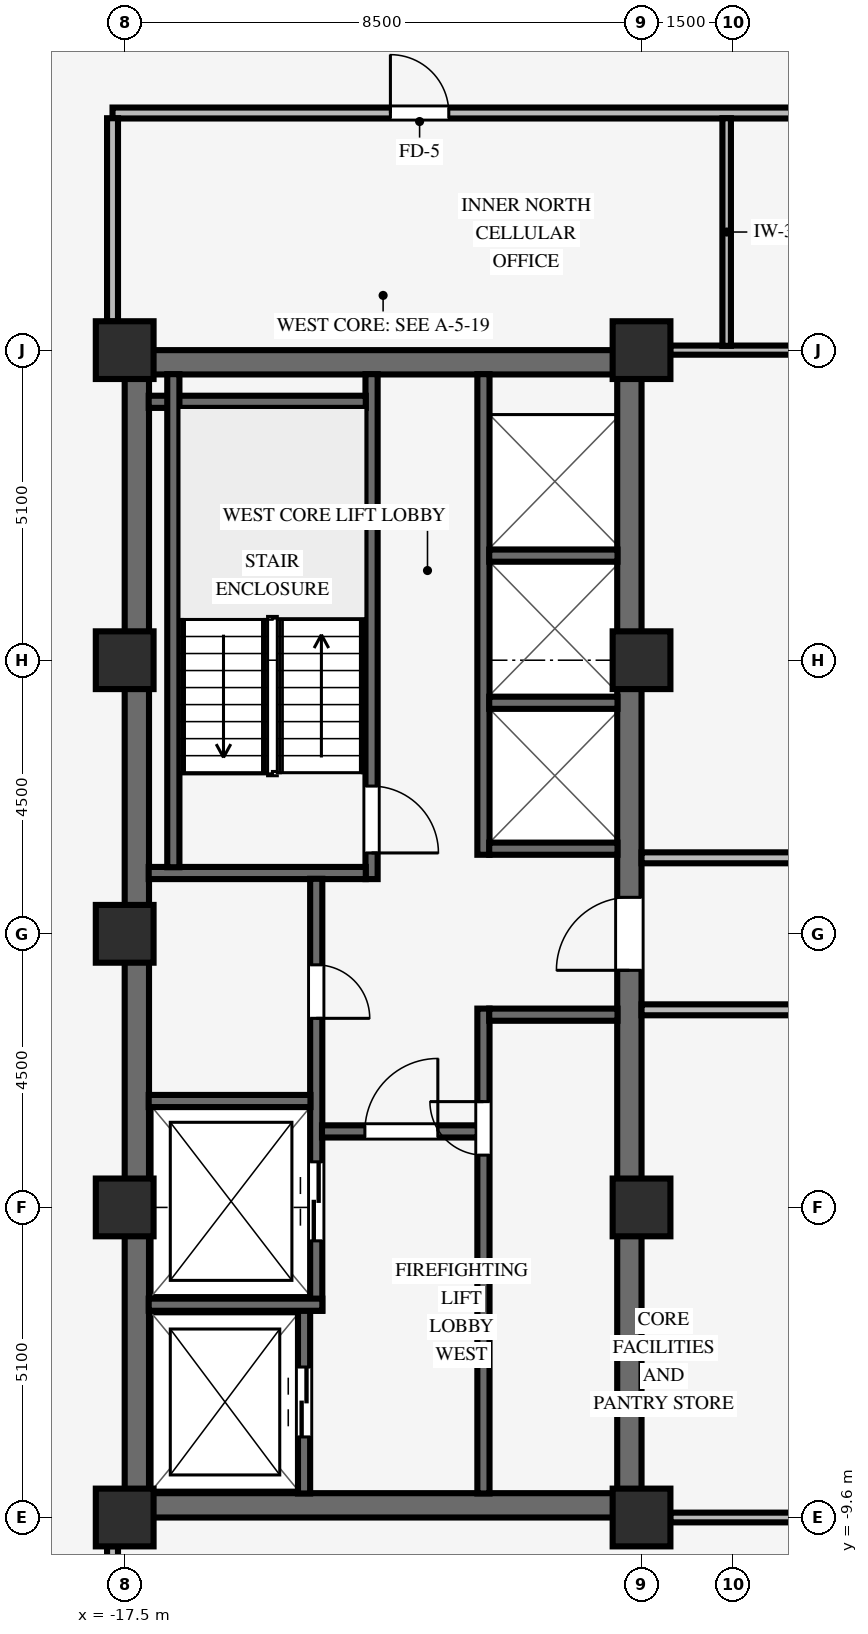
"""IFC4 building model, lengths in metres.
Left out: names, types, materials, properties, quantities, classifications, styles, units other than length and angle.
Written with IfcOpenShell. Run it as: python <this file> out.ifc"""

import sys

from ifc_helpers import new_model, si_unit, direction, frame, frame_2d, origin, origin_2d, place, context, subcontext, project, spatial, rectangle, extrude, source, transform, mapped, element, fill, save


model = new_model("IFC4")
c1 = context("Model", 3, precision=1e-05, world=origin(), true_north=direction((0.0, 1.0)))
c2 = subcontext(c1, "Body", "Model", "MODEL_VIEW")
j1 = project(units=[si_unit("LENGTHUNIT", "METRE"), si_unit("PLANEANGLEUNIT", "RADIAN")], contexts=[c1])
p1 = place(None, origin())
s1 = spatial("IfcSite", under=j1, at=p1, CompositionType="ELEMENT")
p2 = place(p1, origin())
s2 = spatial("IfcBuilding", under=s1, at=p2, CompositionType="ELEMENT")
p3 = place(p2, frame((0.0, 0.0, 142.1)))
s3 = spatial("IfcBuildingStorey", under=s2, at=p3, CompositionType="ELEMENT", Elevation=142.1)
for number, where, z_axis, x_axis in (
    (1, (-17.5, -9.4, 0.0), (0.0, 0.0, 1.0), (1.0, 0.0, 0.0)),
    (2, (-17.5, 9.4, 0.0), (0.0, 0.0, 1.0), (1.0, 0.0, 0.0)),
):
    element("IfcWall", number, at=place(p3, frame(where, z_axis=z_axis, x_axis=x_axis)), inside=s3, PredefinedType="SHEAR", context=c2, shape_type="SweptSolid", body=[
        extrude(rectangle(XDim=8.5, YDim=0.4, at=frame_2d((4.25, 0.0))), origin(), (0.0, 0.0, 1.0), 3.37),
    ])
p4 = place(p3, frame((-17.3, -9.205, 0.0), z_axis=(0.0, 0.0, 1.0), x_axis=(0.0, 1.0, 0.0)))
e3 = element("IfcWall", 3, at=p4, inside=s3, PredefinedType="SHEAR", context=c2, shape_type="SweptSolid", body=[
    extrude(rectangle(XDim=18.41, YDim=0.4, at=frame_2d((9.205, 0.0))), origin(), (0.0, 0.0, 1.0), 3.37),
])
p5 = place(p3, frame((-9.2, -9.205, 0.0), z_axis=(0.0, 0.0, 1.0), x_axis=(0.0, 1.0, 0.0)))
e4 = element("IfcWall", 4, at=p5, inside=s3, PredefinedType="SHEAR", context=c2, shape_type="SweptSolid", body=[
    extrude(rectangle(XDim=18.41, YDim=0.4, at=frame_2d((9.205, 0.0))), origin(), (0.0, 0.0, 1.0), 3.37),
])
p6 = place(p5, frame((8.605, 0.0, 0.0)))
e5 = element("IfcOpeningElement", 5, at=p6, cuts=e4, PredefinedType="OPENING", context=c2, shape_type="SweptSolid", body=[
    extrude(rectangle(XDim=1.2, YDim=2.15, at=frame_2d((0.6, 1.075))), frame((0.0, 0.21, 0.0), z_axis=(0.0, -1.0, 0.0), x_axis=(1.0, 0.0, 0.0)), (0.0, 0.0, 1.0), 0.42),
])
for number, where, z_axis, x_axis in (
    (6, (-17.5, -9.6, 0.0), (0.0, 0.0, 1.0), (1.0, 0.0, 0.0)),
    (7, (-17.5, -4.5, 0.0), (0.0, 0.0, 1.0), (1.0, 0.0, 0.0)),
    (8, (-17.5, 4.5, 0.0), (0.0, 0.0, 1.0), (1.0, 0.0, 0.0)),
    (9, (-17.5, 9.6, 0.0), (0.0, 0.0, 1.0), (1.0, 0.0, 0.0)),
    (10, (-9.0, -9.6, 0.0), (0.0, 0.0, 1.0), (1.0, 0.0, 0.0)),
    (11, (-9.0, -4.5, 0.0), (0.0, 0.0, 1.0), (1.0, 0.0, 0.0)),
    (12, (-9.0, 4.5, 0.0), (0.0, 0.0, 1.0), (1.0, 0.0, 0.0)),
    (13, (-9.0, 9.6, 0.0), (0.0, 0.0, 1.0), (1.0, 0.0, 0.0)),
    (14, (-17.5, 0.0, 0.0), (0.0, 0.0, 1.0), (1.0, 0.0, 0.0)),
):
    element("IfcColumn", number, at=place(p3, frame(where, z_axis=z_axis, x_axis=x_axis)), inside=s3, PredefinedType="COLUMN", context=c2, shape_type="SweptSolid", body=[
        extrude(rectangle(XDim=0.95, YDim=0.95, at=origin_2d()), origin(), (0.0, 0.0, 1.0), 3.37),
    ])
p7 = place(p3, frame((-13.44, 0.9, 0.0), z_axis=(0.0, 0.0, 1.0), x_axis=(0.0, 1.0, 0.0)))
e15 = element("IfcWall", 15, at=p7, inside=s3, PredefinedType="SHEAR", context=c2, shape_type="SweptSolid", body=[
    extrude(rectangle(XDim=8.305, YDim=0.2, at=frame_2d((4.153, 0.0))), origin(), (0.0, 0.0, 1.0), 3.37),
])
p8 = place(p7, frame((1.53, 0.0, 0.0), z_axis=(0.0, 0.0, 1.0), x_axis=(-1.0, 0.0, 0.0)))
e16 = element("IfcOpeningElement", 16, at=p8, cuts=e15, PredefinedType="OPENING", context=c2, shape_type="SweptSolid", body=[
    extrude(rectangle(XDim=1.1, YDim=2.15, at=frame_2d((0.55, 1.075))), frame((0.0, 0.11, 0.0), z_axis=(0.0, -1.0, 0.0), x_axis=(1.0, 0.0, 0.0)), (0.0, 0.0, 1.0), 0.22),
])
for number, where, z_axis, x_axis in (
    (17, (-17.105, 1.0, 0.0), (0.0, 0.0, 1.0), (1.0, 0.0, 0.0)),
    (18, (-17.105, 8.75, 0.0), (0.0, 0.0, 1.0), (1.0, 0.0, 0.0)),
):
    element("IfcWall", number, at=place(p3, frame(where, z_axis=z_axis, x_axis=x_axis)), inside=s3, PredefinedType="SHEAR", context=c2, shape_type="SweptSolid", body=[
        extrude(rectangle(XDim=3.57, YDim=0.2, at=frame_2d((1.785, 0.0))), origin(), (0.0, 0.0, 1.0), 3.37),
    ])
p9 = place(p3, frame((-16.7, 1.095, 0.0), z_axis=(0.0, 0.0, 1.0), x_axis=(0.0, 1.0, 0.0)))
e19 = element("IfcWall", 19, at=p9, inside=s3, PredefinedType="SHEAR", context=c2, shape_type="SweptSolid", body=[
    extrude(rectangle(XDim=8.11, YDim=0.2, at=frame_2d((4.055, 0.0))), origin(), (0.0, 0.0, 1.0), 3.37),
])
p10 = place(p3, frame((-14.55, -9.205, 0.0), z_axis=(0.0, 0.0, 1.0), x_axis=(0.0, 1.0, 0.0)))
e20 = element("IfcWall", 20, at=p10, inside=s3, PredefinedType="SHEAR", context=c2, shape_type="SweptSolid", body=[
    extrude(rectangle(XDim=3.01, YDim=0.2, at=frame_2d((1.505, 0.0))), origin(), (0.0, 0.0, 1.0), 3.37),
])
p11 = place(p10, frame((0.93, 0.0, 0.0)))
e21 = element("IfcOpeningElement", 21, at=p11, cuts=e20, PredefinedType="OPENING", context=c2, shape_type="SweptSolid", body=[
    extrude(rectangle(XDim=1.15, YDim=2.15, at=frame_2d((0.575, 1.075))), frame((0.0, 0.11, 0.0), z_axis=(0.0, -1.0, 0.0), x_axis=(1.0, 0.0, 0.0)), (0.0, 0.0, 1.0), 0.22),
])
p12 = place(p3, frame((-14.35, -6.2, 0.0), z_axis=(0.0, 0.0, 1.0), x_axis=(0.0, 1.0, 0.0)))
e22 = element("IfcWall", 22, at=p12, inside=s3, PredefinedType="SHEAR", context=c2, shape_type="SweptSolid", body=[
    extrude(rectangle(XDim=7.105, YDim=0.2, at=frame_2d((3.552, 0.0))), origin(), (0.0, 0.0, 1.0), 3.37),
])
p13 = place(p12, frame((5.69, 0.0, 0.0), z_axis=(0.0, 0.0, 1.0), x_axis=(-1.0, 0.0, 0.0)))
e23 = element("IfcOpeningElement", 23, at=p13, cuts=e22, PredefinedType="OPENING", context=c2, shape_type="SweptSolid", body=[
    extrude(rectangle(XDim=0.88, YDim=2.1, at=frame_2d((0.44, 1.05))), frame((0.0, 0.11, 0.0), z_axis=(0.0, -1.0, 0.0), x_axis=(1.0, 0.0, 0.0)), (0.0, 0.0, 1.0), 0.22),
])
p14 = place(p12, frame((1.15, 0.0, 0.0)))
e24 = element("IfcOpeningElement", 24, at=p14, cuts=e22, PredefinedType="OPENING", context=c2, shape_type="SweptSolid", body=[
    extrude(rectangle(XDim=1.3, YDim=2.2, at=frame_2d((0.65, 1.1))), frame((0.0, 0.11, 0.0), z_axis=(0.0, -1.0, 0.0), x_axis=(1.0, 0.0, 0.0)), (0.0, 0.0, 1.0), 0.22),
])
p15 = place(p3, frame((-17.105, -6.1, 0.0), z_axis=(0.0, 0.0, 1.0), x_axis=(1.0, 0.0, 0.0)))
e25 = element("IfcWall", 25, at=p15, inside=s3, PredefinedType="SHEAR", context=c2, shape_type="SweptSolid", body=[
    extrude(rectangle(XDim=2.855, YDim=0.2, at=frame_2d((1.427, 0.0))), origin(), (0.0, 0.0, 1.0), 3.37),
])
p16 = place(p3, frame((-17.105, -2.75, 0.0), z_axis=(0.0, 0.0, 1.0), x_axis=(1.0, 0.0, 0.0)))
e26 = element("IfcWall", 26, at=p16, inside=s3, PredefinedType="SHEAR", context=c2, shape_type="SweptSolid", body=[
    extrude(rectangle(XDim=2.66, YDim=0.2, at=frame_2d((1.33, 0.0))), origin(), (0.0, 0.0, 1.0), 3.37),
])
p17 = place(p3, frame((-11.6, -9.205, 0.0), z_axis=(0.0, 0.0, 1.0), x_axis=(0.0, 1.0, 0.0)))
e27 = element("IfcWall", 27, at=p17, inside=s3, PredefinedType="SHEAR", context=c2, shape_type="SweptSolid", body=[
    extrude(rectangle(XDim=7.975, YDim=0.2, at=frame_2d((3.988, 0.0))), origin(), (0.0, 0.0, 1.0), 3.37),
])
p18 = place(p17, frame((5.565, 0.0, 0.0)))
e28 = element("IfcOpeningElement", 28, at=p18, cuts=e27, PredefinedType="OPENING", context=c2, shape_type="SweptSolid", body=[
    extrude(rectangle(XDim=0.88, YDim=2.1, at=frame_2d((0.44, 1.05))), frame((0.0, 0.11, 0.0), z_axis=(0.0, -1.0, 0.0), x_axis=(1.0, 0.0, 0.0)), (0.0, 0.0, 1.0), 0.22),
])
p19 = place(p3, frame((-14.255, -3.25, 0.0), z_axis=(0.0, 0.0, 1.0), x_axis=(1.0, 0.0, 0.0)))
e29 = element("IfcWall", 29, at=p19, inside=s3, PredefinedType="SHEAR", context=c2, shape_type="SweptSolid", body=[
    extrude(rectangle(XDim=2.56, YDim=0.2, at=frame_2d((1.28, 0.0))), origin(), (0.0, 0.0, 1.0), 3.37),
])
p20 = place(p19, frame((0.705, 0.0, 0.0)))
e30 = element("IfcOpeningElement", 30, at=p20, cuts=e29, PredefinedType="OPENING", context=c2, shape_type="SweptSolid", body=[
    extrude(rectangle(XDim=1.2, YDim=2.15, at=frame_2d((0.6, 1.075))), frame((0.0, 0.11, 0.0), z_axis=(0.0, -1.0, 0.0), x_axis=(1.0, 0.0, 0.0)), (0.0, 0.0, 1.0), 0.22),
])
p21 = place(p3, frame((-11.505, -1.33, 0.0), z_axis=(0.0, 0.0, 1.0), x_axis=(1.0, 0.0, 0.0)))
e31 = element("IfcWall", 31, at=p21, inside=s3, PredefinedType="SHEAR", context=c2, shape_type="SweptSolid", body=[
    extrude(rectangle(XDim=2.11, YDim=0.2, at=frame_2d((1.055, 0.0))), origin(), (0.0, 0.0, 1.0), 3.37),
])
p22 = place(p3, frame((-11.6, 1.3, 0.0), z_axis=(0.0, 0.0, 1.0), x_axis=(0.0, 1.0, 0.0)))
e32 = element("IfcWall", 32, at=p22, inside=s3, PredefinedType="SHEAR", context=c2, shape_type="SweptSolid", body=[
    extrude(rectangle(XDim=7.905, YDim=0.2, at=frame_2d((3.953, 0.0))), origin(), (0.0, 0.0, 1.0), 3.37),
])
for number, where, z_axis, x_axis in (
    (33, (-11.505, 1.4, 0.0), (0.0, 0.0, 1.0), (1.0, 0.0, 0.0)),
    (34, (-11.505, 3.8, 0.0), (0.0, 0.0, 1.0), (1.0, 0.0, 0.0)),
    (35, (-11.505, 6.22, 0.0), (0.0, 0.0, 1.0), (1.0, 0.0, 0.0)),
):
    element("IfcWall", number, at=place(p3, frame(where, z_axis=z_axis, x_axis=x_axis)), inside=s3, PredefinedType="SHEAR", context=c2, shape_type="SweptSolid", body=[
        extrude(rectangle(XDim=2.11, YDim=0.2, at=frame_2d((1.055, 0.0))), origin(), (0.0, 0.0, 1.0), 3.37),
    ])
p23 = place(p3, frame((-8.529, -9.6, 0.0), z_axis=(0.0, 0.0, 1.0), x_axis=(1.0, 0.0, 0.0)))
e36 = element("IfcWall", 36, at=p23, inside=s3, PredefinedType="PARTITIONING", context=c2, shape_type="SweptSolid", body=[
    extrude(rectangle(XDim=8.353, YDim=0.16, at=frame_2d((4.177, 0.0))), origin(), (0.0, 0.0, 1.0), 2.405),
])
p24 = place(p3, frame((-9.0, -1.25, 0.0), z_axis=(0.0, 0.0, 1.0), x_axis=(1.0, 0.0, 0.0)))
e37 = element("IfcWall", 37, at=p24, inside=s3, PredefinedType="PARTITIONING", context=c2, shape_type="SweptSolid", body=[
    extrude(rectangle(XDim=15.6, YDim=0.18, at=frame_2d((7.8, 0.0))), origin(), (0.0, 0.0, 1.0), 3.36),
])
p25 = place(p24, frame((3.92, 0.0, 0.0)))
e38 = element("IfcOpeningElement", 38, at=p25, cuts=e37, PredefinedType="OPENING", context=c2, shape_type="SweptSolid", body=[
    extrude(rectangle(XDim=0.96, YDim=2.1, at=frame_2d((0.48, 1.05))), frame((0.0, 0.1, 0.0), z_axis=(0.0, -1.0, 0.0), x_axis=(1.0, 0.0, 0.0)), (0.0, 0.0, 1.0), 0.2),
])
p26 = place(p3, frame((-9.0, 1.25, 0.0), z_axis=(0.0, 0.0, 1.0), x_axis=(1.0, 0.0, 0.0)))
e39 = element("IfcWall", 39, at=p26, inside=s3, PredefinedType="PARTITIONING", context=c2, shape_type="SweptSolid", body=[
    extrude(rectangle(XDim=15.6, YDim=0.18, at=frame_2d((7.8, 0.0))), origin(), (0.0, 0.0, 1.0), 3.36),
])
p27 = place(p26, frame((4.12, 0.0, 0.0)))
e40 = element("IfcOpeningElement", 40, at=p27, cuts=e39, PredefinedType="OPENING", context=c2, shape_type="SweptSolid", body=[
    extrude(rectangle(XDim=0.96, YDim=2.1, at=frame_2d((0.48, 1.05))), frame((0.0, 0.1, 0.0), z_axis=(0.0, -1.0, 0.0), x_axis=(1.0, 0.0, 0.0)), (0.0, 0.0, 1.0), 0.2),
])
p28 = place(p3, frame((-8.529, 9.6, 0.0), z_axis=(0.0, 0.0, 1.0), x_axis=(1.0, 0.0, 0.0)))
e41 = element("IfcWall", 41, at=p28, inside=s3, PredefinedType="PARTITIONING", context=c2, shape_type="SweptSolid", body=[
    extrude(rectangle(XDim=8.353, YDim=0.15, at=frame_2d((4.177, 0.0))), origin(), (0.0, 0.0, 1.0), 2.405),
])
p29 = place(p3, frame((-17.7, 13.5, 0.0), z_axis=(0.0, 0.0, 1.0), x_axis=(1.0, 0.0, 0.0)))
e42 = element("IfcWall", 42, at=p29, inside=s3, PredefinedType="PARTITIONING", context=c2, shape_type="SweptSolid", body=[
    extrude(rectangle(XDim=24.3, YDim=0.18, at=frame_2d((12.15, 0.0))), origin(), (0.0, 0.0, 1.0), 2.998),
])
p30 = place(p29, frame((4.57, 0.0, 0.0)))
e43 = element("IfcOpeningElement", 43, at=p30, cuts=e42, PredefinedType="OPENING", context=c2, shape_type="SweptSolid", body=[
    extrude(rectangle(XDim=0.96, YDim=2.1, at=frame_2d((0.48, 1.05))), frame((0.0, 0.1, 0.0), z_axis=(0.0, -1.0, 0.0), x_axis=(1.0, 0.0, 0.0)), (0.0, 0.0, 1.0), 0.2),
])
p31 = place(p29, frame((13.72, 0.0, 0.0)))
e44 = element("IfcOpeningElement", 44, at=p31, cuts=e42, PredefinedType="OPENING", context=c2, shape_type="SweptSolid", body=[
    extrude(rectangle(XDim=0.96, YDim=2.1, at=frame_2d((0.48, 1.05))), frame((0.0, 0.1, 0.0), z_axis=(0.0, -1.0, 0.0), x_axis=(1.0, 0.0, 0.0)), (0.0, 0.0, 1.0), 0.2),
])
p32 = place(p29, frame((18.9, 0.0, 0.0)))
e45 = element("IfcOpeningElement", 45, at=p32, cuts=e42, PredefinedType="OPENING", context=c2, shape_type="SweptSolid", body=[
    extrude(rectangle(XDim=0.9, YDim=2.1, at=frame_2d((0.45, 1.05))), frame((0.0, 0.1, 0.0), z_axis=(0.0, -1.0, 0.0), x_axis=(1.0, 0.0, 0.0)), (0.0, 0.0, 1.0), 0.2),
])
p33 = place(p29, frame((21.0, 0.0, 0.0)))
e46 = element("IfcOpeningElement", 46, at=p33, cuts=e42, PredefinedType="OPENING", context=c2, shape_type="SweptSolid", body=[
    extrude(rectangle(XDim=0.9, YDim=2.1, at=frame_2d((0.45, 1.05))), frame((0.0, 0.1, 0.0), z_axis=(0.0, -1.0, 0.0), x_axis=(1.0, 0.0, 0.0)), (0.0, 0.0, 1.0), 0.2),
])
for number, where, z_axis, x_axis in (
    (47, (-17.7, -13.414, 0.0), (0.0, 0.0, 1.0), (0.0, 1.0, 0.0)),
    (48, (-17.7, 10.071, 0.0), (0.0, 0.0, 1.0), (0.0, 1.0, 0.0)),
):
    element("IfcWall", number, at=place(p3, frame(where, z_axis=z_axis, x_axis=x_axis)), inside=s3, PredefinedType="PARTITIONING", context=c2, shape_type="SweptSolid", body=[
        extrude(rectangle(XDim=3.343, YDim=0.18, at=frame_2d((1.671, 0.0))), origin(), (0.0, 0.0, 1.0), 2.816),
    ])
p34 = place(p3, frame((-7.6, 9.671, 0.0), z_axis=(0.0, 0.0, 1.0), x_axis=(0.0, 1.0, 0.0)))
e49 = element("IfcWall", 49, at=p34, inside=s3, PredefinedType="PARTITIONING", context=c2, shape_type="SweptSolid", body=[
    extrude(rectangle(XDim=3.743, YDim=0.14, at=frame_2d((1.872, 0.0))), origin(), (0.0, 0.0, 1.0), 3.36),
])
m1 = source(origin(), c2, "Body", "SweptSolid", [
    extrude(rectangle(XDim=1.1, YDim=2.15, at=frame_2d((0.55, 1.075))), frame((0.0, 0.025, 0.0), z_axis=(0.0, -1.0, 0.0), x_axis=(1.0, 0.0, 0.0)), (0.0, 0.0, 1.0), 0.05),
])
p35 = place(p8, origin())
e50 = element("IfcDoor", 50, at=p35, inside=s3, OperationType="SINGLE_SWING_RIGHT", PredefinedType="DOOR", context=c2, shape_type="MappedRepresentation", body=[
    mapped(m1, transform((0.0, 0.0, 0.0), scale=1.0)),
])
fill(e16, e50)
m2 = source(origin(), c2, "Body", "SweptSolid", [
    extrude(rectangle(XDim=0.88, YDim=2.1, at=frame_2d((0.44, 1.05))), frame((0.0, 0.025, 0.0), z_axis=(0.0, -1.0, 0.0), x_axis=(1.0, 0.0, 0.0)), (0.0, 0.0, 1.0), 0.05),
])
p36 = place(p13, origin())
e51 = element("IfcDoor", 51, at=p36, inside=s3, OperationType="SINGLE_SWING_RIGHT", PredefinedType="DOOR", context=c2, shape_type="MappedRepresentation", body=[
    mapped(m2, transform((0.0, 0.0, 0.0), scale=1.0)),
])
fill(e23, e51)
m3 = source(origin(), c2, "Body", "SweptSolid", [
    extrude(rectangle(XDim=1.2, YDim=2.15, at=frame_2d((0.6, 1.075))), frame((0.0, 0.025, 0.0), z_axis=(0.0, -1.0, 0.0), x_axis=(1.0, 0.0, 0.0)), (0.0, 0.0, 1.0), 0.05),
])
p37 = place(p20, origin())
e52 = element("IfcDoor", 52, at=p37, inside=s3, OperationType="SINGLE_SWING_RIGHT", PredefinedType="DOOR", context=c2, shape_type="MappedRepresentation", body=[
    mapped(m3, transform((0.0, 0.0, 0.0), scale=1.0)),
])
fill(e30, e52)
p38 = place(p18, origin())
e53 = element("IfcDoor", 53, at=p38, inside=s3, OperationType="SINGLE_SWING_RIGHT", PredefinedType="DOOR", context=c2, shape_type="MappedRepresentation", body=[
    mapped(m2, transform((0.0, 0.0, 0.0), scale=1.0)),
])
fill(e28, e53)
p39 = place(p6, origin())
e54 = element("IfcDoor", 54, at=p39, inside=s3, OperationType="SINGLE_SWING_LEFT", PredefinedType="DOOR", context=c2, shape_type="MappedRepresentation", body=[
    mapped(m3, transform((0.0, 0.0, 0.0), scale=1.0)),
])
fill(e5, e54)
m4 = source(origin(), c2, "Body", "SweptSolid", [
    extrude(rectangle(XDim=1.15, YDim=2.15, at=frame_2d((0.575, 1.075))), frame((0.0, 0.025, 0.0), z_axis=(0.0, -1.0, 0.0), x_axis=(1.0, 0.0, 0.0)), (0.0, 0.0, 1.0), 0.05),
])
p40 = place(p11, origin())
e55 = element("IfcDoor", 55, at=p40, inside=s3, OperationType="DOUBLE_DOOR_SLIDING", PredefinedType="DOOR", context=c2, shape_type="MappedRepresentation", body=[
    mapped(m4, transform((0.0, 0.0, 0.0), scale=1.0)),
])
fill(e21, e55)
m5 = source(origin(), c2, "Body", "SweptSolid", [
    extrude(rectangle(XDim=1.3, YDim=2.2, at=frame_2d((0.65, 1.1))), frame((0.0, 0.025, 0.0), z_axis=(0.0, -1.0, 0.0), x_axis=(1.0, 0.0, 0.0)), (0.0, 0.0, 1.0), 0.05),
])
p41 = place(p14, origin())
e56 = element("IfcDoor", 56, at=p41, inside=s3, OperationType="DOUBLE_DOOR_SLIDING", PredefinedType="DOOR", context=c2, shape_type="MappedRepresentation", body=[
    mapped(m5, transform((0.0, 0.0, 0.0), scale=1.0)),
])
fill(e24, e56)
m6 = source(origin(), c2, "Body", "SweptSolid", [
    extrude(rectangle(XDim=0.96, YDim=2.1, at=frame_2d((0.48, 1.05))), frame((0.0, 0.025, 0.0), z_axis=(0.0, -1.0, 0.0), x_axis=(1.0, 0.0, 0.0)), (0.0, 0.0, 1.0), 0.05),
])
p42 = place(p30, origin())
e57 = element("IfcDoor", 57, at=p42, inside=s3, OperationType="SINGLE_SWING_LEFT", PredefinedType="DOOR", context=c2, shape_type="MappedRepresentation", body=[
    mapped(m6, transform((0.0, 0.0, 0.0), scale=1.0)),
])
fill(e43, e57)
save(model, sys.argv[1])
